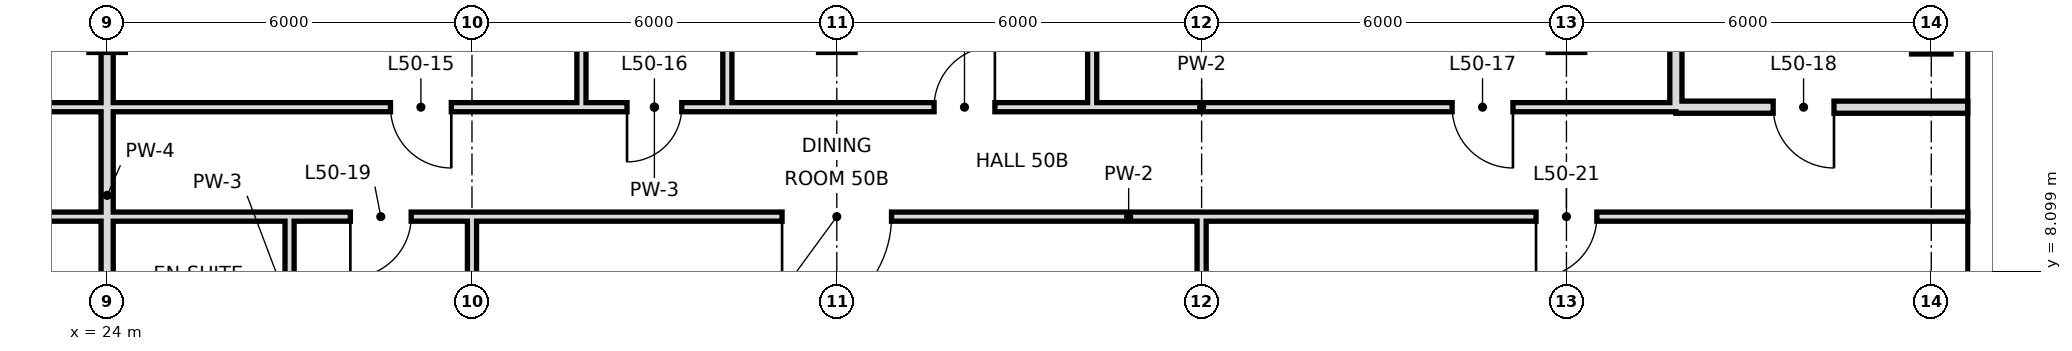
"""IFC4 building model, lengths in metres.
Left out: names, types, materials, properties, quantities, classifications, styles, units other than length and angle.
Written with IfcOpenShell. Run it as: python <this file> out.ifc"""

import sys

from ifc_helpers import new_model, si_unit, direction, frame, frame_2d, origin, origin_2d, place, context, subcontext, project, spatial, rectangle, hollow_rectangle, extrude, element, fill, save


model = new_model("IFC4")
c1 = context("Model", 3, precision=1e-05, world=origin(), true_north=direction((0.0, 1.0)))
c2 = subcontext(c1, "Body", "Model", "MODEL_VIEW")
j1 = project(units=[si_unit("LENGTHUNIT", "METRE"), si_unit("PLANEANGLEUNIT", "RADIAN")], contexts=[c1])
p1 = place(None, origin())
s1 = spatial("IfcSite", under=j1, at=p1, CompositionType="ELEMENT")
p2 = place(p1, origin())
s2 = spatial("IfcBuilding", under=s1, at=p2, CompositionType="ELEMENT")
p3 = place(p2, frame((0.0, 0.0, 215.4)))
s3 = spatial("IfcBuildingStorey", under=s2, at=p3, CompositionType="ELEMENT", Elevation=215.4)
p4 = place(p3, frame((54.0, 12.0, 0.0), z_axis=(0.0, 0.0, 1.0), x_axis=(1.0, 0.0, 0.0)))
e1 = element("IfcColumn", 1, at=p4, inside=s3, PredefinedType="COLUMN", context=c2, shape_type="SweptSolid", body=[
    extrude(hollow_rectangle(XDim=0.65, YDim=0.65, WallThickness=0.032, at=origin_2d()), origin(), (0.0, 0.0, 1.0), 3.6),
])
p5 = place(p3, frame((24.0, 0.0, 0.0), z_axis=(0.0, 0.0, 1.0), x_axis=(0.0, 1.0, 0.0)))
e2 = element("IfcWall", 2, at=p5, inside=s3, PredefinedType="SOLIDWALL", context=c2, shape_type="SweptSolid", body=[
    extrude(rectangle(XDim=18.7, YDim=0.2, at=frame_2d((9.35, 0.0))), origin(), (0.0, 0.0, 1.0), 2.72),
])
p6 = place(p3, frame((27.0, 6.0, 0.0), z_axis=(0.0, 0.0, 1.0), x_axis=(0.0, 1.0, 0.0)))
e3 = element("IfcWall", 3, at=p6, inside=s3, PredefinedType="PARTITIONING", context=c2, shape_type="SweptSolid", body=[
    extrude(rectangle(XDim=3.0, YDim=0.15, at=frame_2d((1.5, 0.0))), origin(), (0.0, 0.0, 1.0), 3.42),
])
p7 = place(p3, frame((30.0, -0.6, 0.0), z_axis=(0.0, 0.0, 1.0), x_axis=(0.0, 1.0, 0.0)))
e4 = element("IfcWall", 4, at=p7, inside=s3, PredefinedType="PARTITIONING", context=c2, shape_type="SweptSolid", body=[
    extrude(rectangle(XDim=9.6, YDim=0.15, at=frame_2d((4.8, 0.0))), origin(), (0.0, 0.0, 1.0), 2.72),
])
for number, where, z_axis, x_axis in (
    (5, (31.8, 10.8, 0.0), (0.0, 0.0, 1.0), (0.0, 1.0, 0.0)),
    (6, (34.2, 10.8, 0.0), (0.0, 0.0, 1.0), (0.0, 1.0, 0.0)),
    (7, (40.2, 10.8, 0.0), (0.0, 0.0, 1.0), (0.0, 1.0, 0.0)),
):
    element("IfcWall", number, at=place(p3, frame(where, z_axis=z_axis, x_axis=x_axis)), inside=s3, PredefinedType="PARTITIONING", context=c2, shape_type="SweptSolid", body=[
        extrude(rectangle(XDim=7.9, YDim=0.15, at=frame_2d((3.95, 0.0))), origin(), (0.0, 0.0, 1.0), 3.42),
    ])
p8 = place(p3, frame((42.0, -0.6, 0.0), z_axis=(0.0, 0.0, 1.0), x_axis=(0.0, 1.0, 0.0)))
e8 = element("IfcWall", 8, at=p8, inside=s3, PredefinedType="PARTITIONING", context=c2, shape_type="SweptSolid", body=[
    extrude(rectangle(XDim=9.6, YDim=0.15, at=frame_2d((4.8, 0.0))), origin(), (0.0, 0.0, 1.0), 2.72),
])
p9 = place(p3, frame((49.8, 10.8, 0.0), z_axis=(0.0, 0.0, 1.0), x_axis=(0.0, 1.0, 0.0)))
e9 = element("IfcWall", 9, at=p9, inside=s3, PredefinedType="SOLIDWALL", context=c2, shape_type="SweptSolid", body=[
    extrude(rectangle(XDim=7.2, YDim=0.2, at=frame_2d((3.6, 0.0))), origin(), (0.0, 0.0, 1.0), 2.97),
])
p10 = place(p3, frame((49.8, 10.8, 0.0), z_axis=(0.0, 0.0, 1.0), x_axis=(1.0, 0.0, 0.0)))
e10 = element("IfcWall", 10, at=p10, inside=s3, PredefinedType="SOLIDWALL", context=c2, shape_type="SweptSolid", body=[
    extrude(rectangle(XDim=4.8, YDim=0.2, at=frame_2d((2.4, 0.0))), origin(), (0.0, 0.0, 1.0), 2.97),
])
p11 = place(p10, frame((1.6, 0.0, 0.0)))
e11 = element("IfcOpeningElement", 11, at=p11, cuts=e10, PredefinedType="OPENING", context=c2, shape_type="SweptSolid", body=[
    extrude(rectangle(XDim=1.0, YDim=2.4, at=frame_2d((0.5, 1.2))), frame((0.0, 0.11, 0.0), z_axis=(0.0, -1.0, 0.0), x_axis=(1.0, 0.0, 0.0)), (0.0, 0.0, 1.0), 0.22),
])
p12 = place(p3, frame((7.2, 10.8, 0.0), z_axis=(0.0, 0.0, 1.0), x_axis=(1.0, 0.0, 0.0)))
e12 = element("IfcWall", 12, at=p12, inside=s3, PredefinedType="PARTITIONING", context=c2, shape_type="SweptSolid", body=[
    extrude(rectangle(XDim=24.6, YDim=0.15, at=frame_2d((12.3, 0.0))), origin(), (0.0, 0.0, 1.0), 3.42),
])
p13 = place(p12, frame((1.6, 0.0, 0.0)))
e13 = element("IfcOpeningElement", 13, at=p13, cuts=e12, PredefinedType="OPENING", context=c2, shape_type="SweptSolid", body=[
    extrude(rectangle(XDim=1.0, YDim=2.4, at=frame_2d((0.5, 1.2))), frame((0.0, 0.085, 0.0), z_axis=(0.0, -1.0, 0.0), x_axis=(1.0, 0.0, 0.0)), (0.0, 0.0, 1.0), 0.17),
])
p14 = place(p12, frame((9.04, 0.0, 0.0)))
e14 = element("IfcOpeningElement", 14, at=p14, cuts=e12, PredefinedType="OPENING", context=c2, shape_type="SweptSolid", body=[
    extrude(rectangle(XDim=1.0, YDim=2.4, at=frame_2d((0.5, 1.2))), frame((0.0, 0.085, 0.0), z_axis=(0.0, -1.0, 0.0), x_axis=(1.0, 0.0, 0.0)), (0.0, 0.0, 1.0), 0.17),
])
p15 = place(p12, frame((21.46, 0.0, 0.0)))
e15 = element("IfcOpeningElement", 15, at=p15, cuts=e12, PredefinedType="OPENING", context=c2, shape_type="SweptSolid", body=[
    extrude(rectangle(XDim=1.0, YDim=2.4, at=frame_2d((0.5, 1.2))), frame((0.0, 0.085, 0.0), z_axis=(0.0, -1.0, 0.0), x_axis=(1.0, 0.0, 0.0)), (0.0, 0.0, 1.0), 0.17),
])
p16 = place(p3, frame((34.2, 10.8, 0.0), z_axis=(0.0, 0.0, 1.0), x_axis=(1.0, 0.0, 0.0)))
e16 = element("IfcWall", 16, at=p16, inside=s3, PredefinedType="PARTITIONING", context=c2, shape_type="SweptSolid", body=[
    extrude(rectangle(XDim=15.6, YDim=0.15, at=frame_2d((7.8, 0.0))), origin(), (0.0, 0.0, 1.0), 3.42),
])
p17 = place(p16, frame((3.4, 0.0, 0.0)))
e17 = element("IfcOpeningElement", 17, at=p17, cuts=e16, PredefinedType="OPENING", context=c2, shape_type="SweptSolid", body=[
    extrude(rectangle(XDim=1.0, YDim=2.4, at=frame_2d((0.5, 1.2))), frame((0.0, 0.085, 0.0), z_axis=(0.0, -1.0, 0.0), x_axis=(1.0, 0.0, 0.0)), (0.0, 0.0, 1.0), 0.17),
])
p18 = place(p16, frame((11.92, 0.0, 0.0)))
e18 = element("IfcOpeningElement", 18, at=p18, cuts=e16, PredefinedType="OPENING", context=c2, shape_type="SweptSolid", body=[
    extrude(rectangle(XDim=1.0, YDim=2.4, at=frame_2d((0.5, 1.2))), frame((0.0, 0.085, 0.0), z_axis=(0.0, -1.0, 0.0), x_axis=(1.0, 0.0, 0.0)), (0.0, 0.0, 1.0), 0.17),
])
p19 = place(p3, frame((31.8, 10.8, 0.0), z_axis=(0.0, 0.0, 1.0), x_axis=(1.0, 0.0, 0.0)))
e19 = element("IfcWall", 19, at=p19, inside=s3, PredefinedType="PARTITIONING", context=c2, shape_type="SweptSolid", body=[
    extrude(rectangle(XDim=2.4, YDim=0.15, at=frame_2d((1.2, 0.0))), origin(), (0.0, 0.0, 1.0), 3.42),
])
p20 = place(p19, frame((0.75, 0.0, 0.0)))
e20 = element("IfcOpeningElement", 20, at=p20, cuts=e19, PredefinedType="OPENING", context=c2, shape_type="SweptSolid", body=[
    extrude(rectangle(XDim=0.9, YDim=2.4, at=frame_2d((0.45, 1.2))), frame((0.0, 0.085, 0.0), z_axis=(0.0, -1.0, 0.0), x_axis=(1.0, 0.0, 0.0)), (0.0, 0.0, 1.0), 0.17),
])
p21 = place(p3, frame((6.0, 9.0, 0.0), z_axis=(0.0, 0.0, 1.0), x_axis=(1.0, 0.0, 0.0)))
e21 = element("IfcWall", 21, at=p21, inside=s3, PredefinedType="PARTITIONING", context=c2, shape_type="SweptSolid", body=[
    extrude(rectangle(XDim=18.0, YDim=0.15, at=frame_2d((9.0, 0.0))), origin(), (0.0, 0.0, 1.0), 3.42),
])
p22 = place(p21, frame((5.5, 0.0, 0.0)))
e22 = element("IfcOpeningElement", 22, at=p22, cuts=e21, PredefinedType="OPENING", context=c2, shape_type="SweptSolid", body=[
    extrude(rectangle(XDim=1.0, YDim=2.4, at=frame_2d((0.5, 1.2))), frame((0.0, 0.085, 0.0), z_axis=(0.0, -1.0, 0.0), x_axis=(1.0, 0.0, 0.0)), (0.0, 0.0, 1.0), 0.17),
])
p23 = place(p21, frame((13.6, 0.0, 0.0)))
e23 = element("IfcOpeningElement", 23, at=p23, cuts=e21, PredefinedType="OPENING", context=c2, shape_type="SweptSolid", body=[
    extrude(rectangle(XDim=1.0, YDim=2.4, at=frame_2d((0.5, 1.2))), frame((0.0, 0.085, 0.0), z_axis=(0.0, -1.0, 0.0), x_axis=(1.0, 0.0, 0.0)), (0.0, 0.0, 1.0), 0.17),
])
p24 = place(p3, frame((27.0, 9.0, 0.0), z_axis=(0.0, 0.0, 1.0), x_axis=(1.0, 0.0, 0.0)))
e24 = element("IfcWall", 24, at=p24, inside=s3, PredefinedType="PARTITIONING", context=c2, shape_type="SweptSolid", body=[
    extrude(rectangle(XDim=27.6, YDim=0.15, at=frame_2d((13.8, 0.0))), origin(), (0.0, 0.0, 1.0), 3.42),
])
p25 = place(p24, frame((1.0, 0.0, 0.0)))
e25 = element("IfcOpeningElement", 25, at=p25, cuts=e24, PredefinedType="OPENING", context=c2, shape_type="SweptSolid", body=[
    extrude(rectangle(XDim=1.0, YDim=2.4, at=frame_2d((0.5, 1.2))), frame((0.0, 0.085, 0.0), z_axis=(0.0, -1.0, 0.0), x_axis=(1.0, 0.0, 0.0)), (0.0, 0.0, 1.0), 0.17),
])
p26 = place(p24, frame((8.1, 0.0, 0.0)))
e26 = element("IfcOpeningElement", 26, at=p26, cuts=e24, PredefinedType="OPENING", context=c2, shape_type="SweptSolid", body=[
    extrude(rectangle(XDim=1.8, YDim=2.4, at=frame_2d((0.9, 1.2))), frame((0.0, 0.085, 0.0), z_axis=(0.0, -1.0, 0.0), x_axis=(1.0, 0.0, 0.0)), (0.0, 0.0, 1.0), 0.17),
])
p27 = place(p24, frame((20.5, 0.0, 0.0)))
e27 = element("IfcOpeningElement", 27, at=p27, cuts=e24, PredefinedType="OPENING", context=c2, shape_type="SweptSolid", body=[
    extrude(rectangle(XDim=1.0, YDim=2.4, at=frame_2d((0.5, 1.2))), frame((0.0, 0.085, 0.0), z_axis=(0.0, -1.0, 0.0), x_axis=(1.0, 0.0, 0.0)), (0.0, 0.0, 1.0), 0.17),
])
p28 = place(p3, frame((24.0, 9.0, 0.0), z_axis=(0.0, 0.0, 1.0), x_axis=(1.0, 0.0, 0.0)))
e28 = element("IfcWall", 28, at=p28, inside=s3, PredefinedType="PARTITIONING", context=c2, shape_type="SweptSolid", body=[
    extrude(rectangle(XDim=3.0, YDim=0.15, at=frame_2d((1.5, 0.0))), origin(), (0.0, 0.0, 1.0), 3.42),
])
p29 = place(p17, frame((1.0, 0.0, 0.0), z_axis=(0.0, 0.0, 1.0), x_axis=(-1.0, 0.0, 0.0)))
e29 = element("IfcDoor", 29, at=p29, inside=s3, OperationType="SINGLE_SWING_LEFT", PredefinedType="DOOR", context=c2, shape_type="SweptSolid", body=[
    extrude(rectangle(XDim=1.0, YDim=2.4, at=frame_2d((0.5, 1.2))), frame((0.0, 0.025, 0.0), z_axis=(0.0, -1.0, 0.0), x_axis=(1.0, 0.0, 0.0)), (0.0, 0.0, 1.0), 0.05),
])
fill(e17, e29)
p30 = place(p15, origin())
e30 = element("IfcDoor", 30, at=p30, inside=s3, OperationType="SINGLE_SWING_RIGHT", PredefinedType="DOOR", context=c2, shape_type="SweptSolid", body=[
    extrude(rectangle(XDim=1.0, YDim=2.4, at=frame_2d((0.5, 1.2))), frame((0.0, 0.025, 0.0), z_axis=(0.0, -1.0, 0.0), x_axis=(1.0, 0.0, 0.0)), (0.0, 0.0, 1.0), 0.05),
])
fill(e15, e30)
p31 = place(p20, frame((0.9, 0.0, 0.0), z_axis=(0.0, 0.0, 1.0), x_axis=(-1.0, 0.0, 0.0)))
e31 = element("IfcDoor", 31, at=p31, inside=s3, OperationType="SINGLE_SWING_RIGHT", PredefinedType="DOOR", context=c2, shape_type="SweptSolid", body=[
    extrude(rectangle(XDim=0.9, YDim=2.4, at=frame_2d((0.45, 1.2))), frame((0.0, 0.025, 0.0), z_axis=(0.0, -1.0, 0.0), x_axis=(1.0, 0.0, 0.0)), (0.0, 0.0, 1.0), 0.05),
])
fill(e20, e31)
p32 = place(p18, origin())
e32 = element("IfcDoor", 32, at=p32, inside=s3, OperationType="SINGLE_SWING_RIGHT", PredefinedType="DOOR", context=c2, shape_type="SweptSolid", body=[
    extrude(rectangle(XDim=1.0, YDim=2.4, at=frame_2d((0.5, 1.2))), frame((0.0, 0.025, 0.0), z_axis=(0.0, -1.0, 0.0), x_axis=(1.0, 0.0, 0.0)), (0.0, 0.0, 1.0), 0.05),
])
fill(e18, e32)
p33 = place(p11, origin())
e33 = element("IfcDoor", 33, at=p33, inside=s3, OperationType="SINGLE_SWING_RIGHT", PredefinedType="DOOR", context=c2, shape_type="SweptSolid", body=[
    extrude(rectangle(XDim=1.0, YDim=2.4, at=frame_2d((0.5, 1.2))), frame((0.0, 0.025, 0.0), z_axis=(0.0, -1.0, 0.0), x_axis=(1.0, 0.0, 0.0)), (0.0, 0.0, 1.0), 0.05),
])
fill(e11, e33)
p34 = place(p25, frame((1.0, 0.0, 0.0), z_axis=(0.0, 0.0, 1.0), x_axis=(-1.0, 0.0, 0.0)))
e34 = element("IfcDoor", 34, at=p34, inside=s3, OperationType="SINGLE_SWING_RIGHT", PredefinedType="DOOR", context=c2, shape_type="SweptSolid", body=[
    extrude(rectangle(XDim=1.0, YDim=2.4, at=frame_2d((0.5, 1.2))), frame((0.0, 0.025, 0.0), z_axis=(0.0, -1.0, 0.0), x_axis=(1.0, 0.0, 0.0)), (0.0, 0.0, 1.0), 0.05),
])
fill(e25, e34)
p35 = place(p26, frame((1.8, 0.0, 0.0), z_axis=(0.0, 0.0, 1.0), x_axis=(-1.0, 0.0, 0.0)))
e35 = element("IfcDoor", 35, at=p35, inside=s3, OperationType="SINGLE_SWING_RIGHT", PredefinedType="DOOR", context=c2, shape_type="SweptSolid", body=[
    extrude(rectangle(XDim=1.8, YDim=2.4, at=frame_2d((0.9, 1.2))), frame((0.0, 0.025, 0.0), z_axis=(0.0, -1.0, 0.0), x_axis=(1.0, 0.0, 0.0)), (0.0, 0.0, 1.0), 0.05),
])
fill(e26, e35)
p36 = place(p27, frame((1.0, 0.0, 0.0), z_axis=(0.0, 0.0, 1.0), x_axis=(-1.0, 0.0, 0.0)))
e36 = element("IfcDoor", 36, at=p36, inside=s3, OperationType="SINGLE_SWING_RIGHT", PredefinedType="DOOR", context=c2, shape_type="SweptSolid", body=[
    extrude(rectangle(XDim=1.0, YDim=2.4, at=frame_2d((0.5, 1.2))), frame((0.0, 0.025, 0.0), z_axis=(0.0, -1.0, 0.0), x_axis=(1.0, 0.0, 0.0)), (0.0, 0.0, 1.0), 0.05),
])
fill(e27, e36)
save(model, sys.argv[1])
